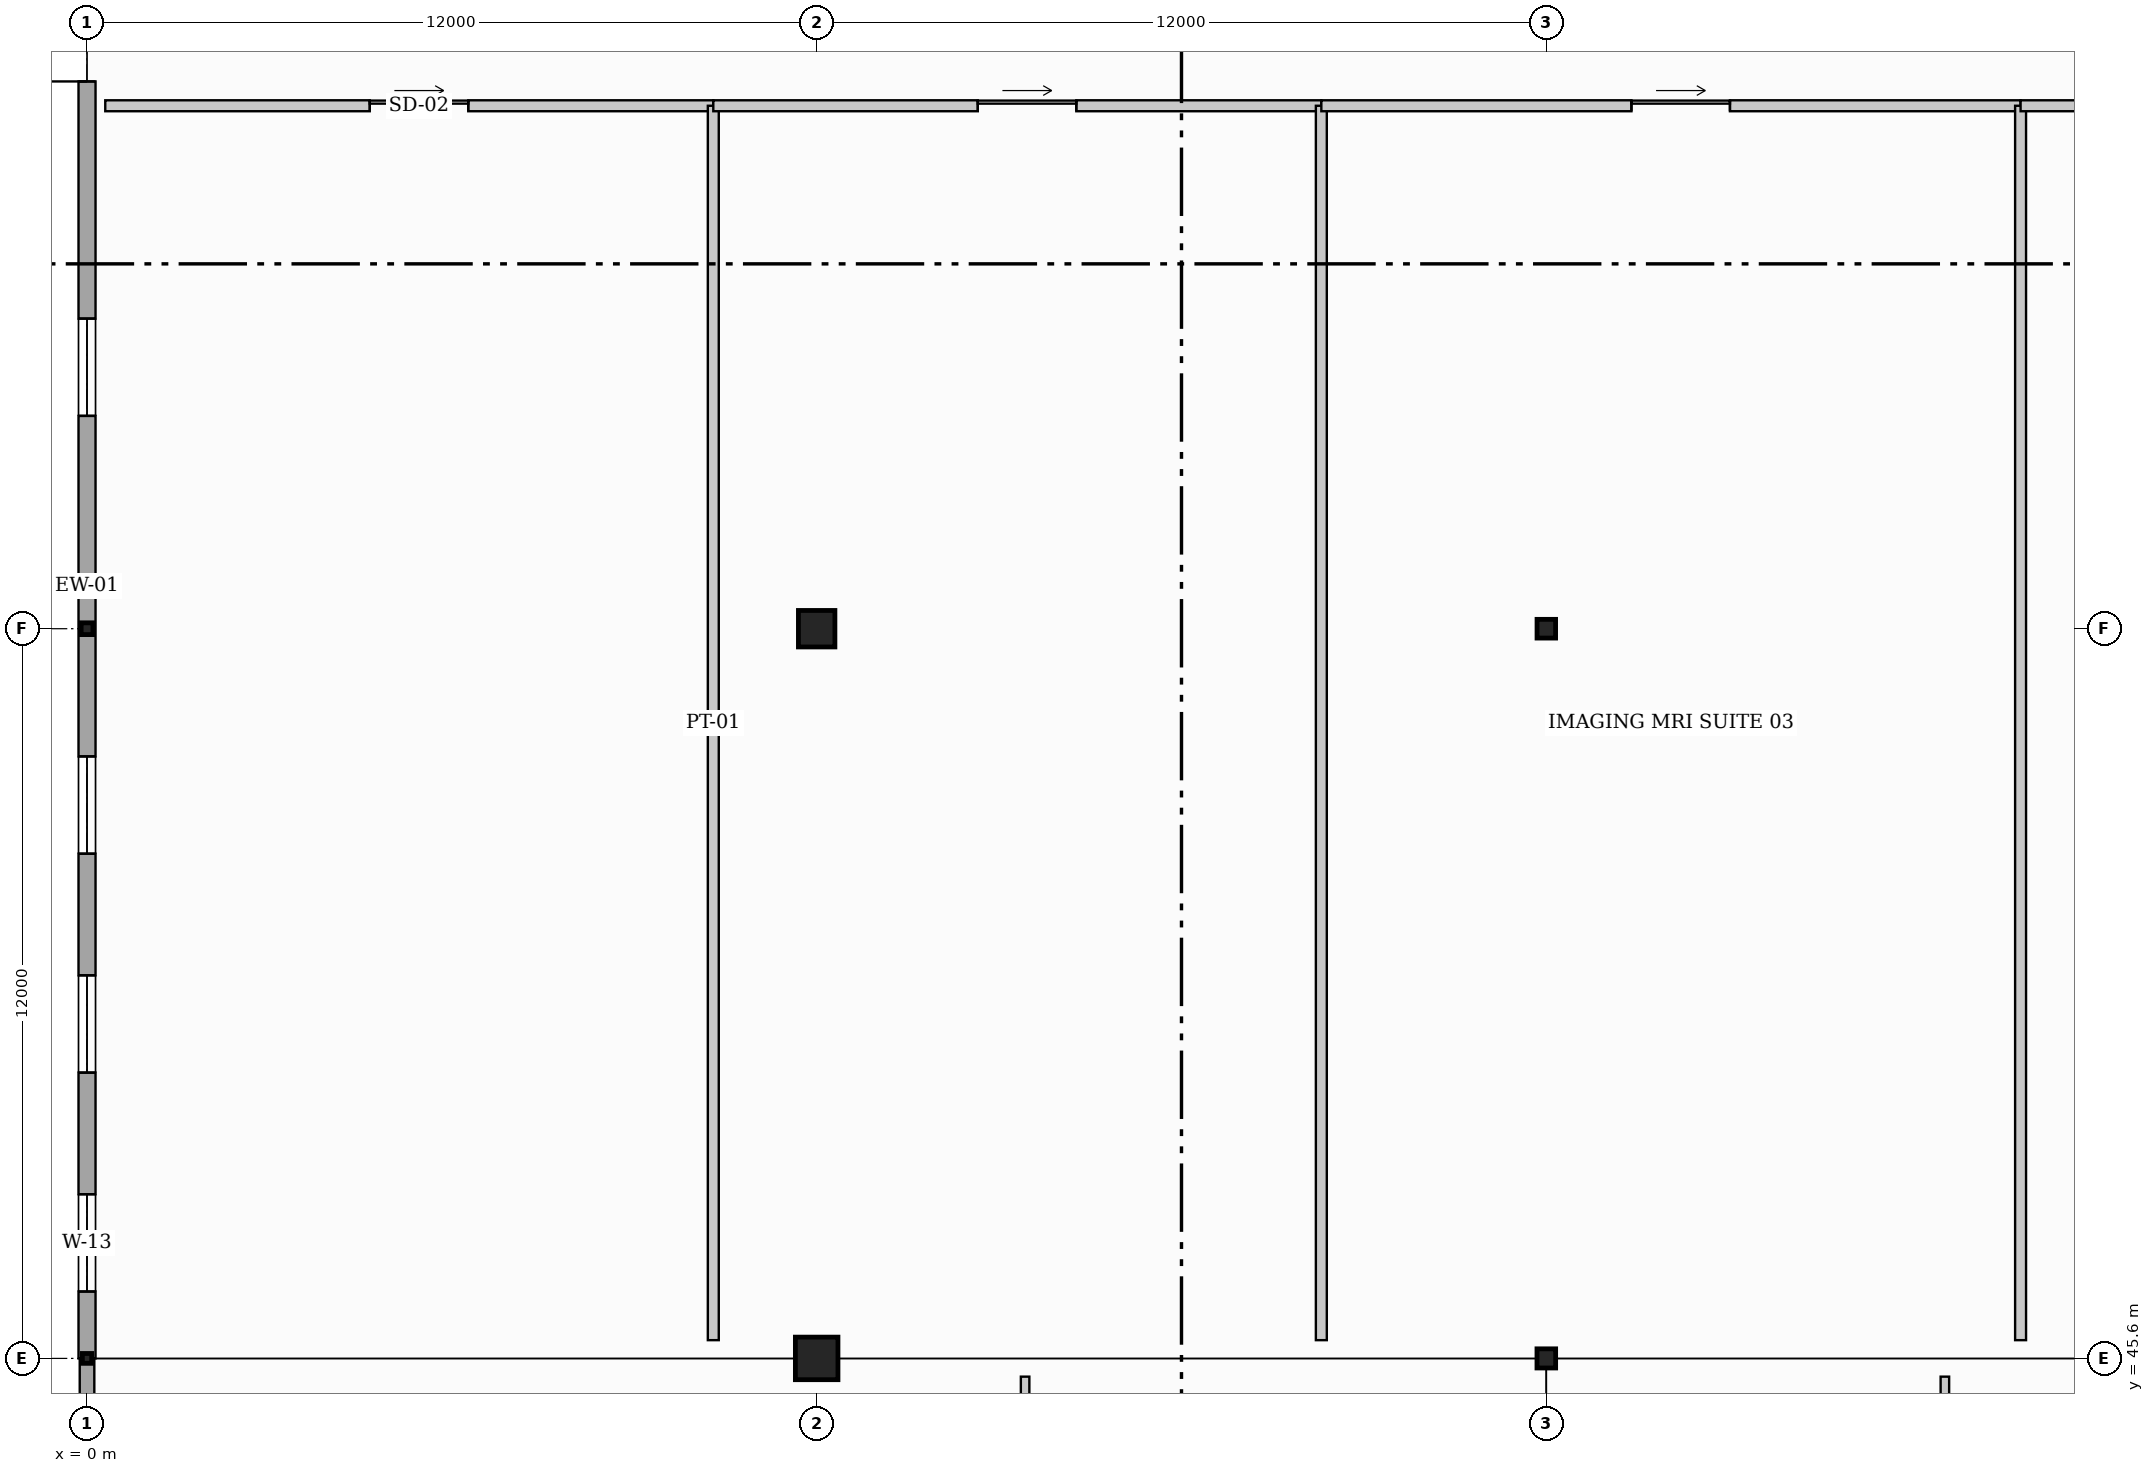
"""IFC4 building model, lengths in metres.
Left out: names, types, materials, properties, quantities, classifications, styles, units other than length and angle.
Written with IfcOpenShell. Run it as: python <this file> out.ifc"""

import sys

from ifc_helpers import new_model, si_unit, direction, frame, frame_2d, origin, origin_2d, place, context, subcontext, project, spatial, rectangle, hollow_circle, i_section, extrude, element, fill, save


model = new_model("IFC4")
c1 = context("Model", 3, precision=1e-05, world=origin(), true_north=direction((0.0, 1.0)))
c2 = subcontext(c1, "Body", "Model", "MODEL_VIEW")
j1 = project(units=[si_unit("LENGTHUNIT", "METRE"), si_unit("PLANEANGLEUNIT", "RADIAN")], contexts=[c1])
p1 = place(None, origin())
s1 = spatial("IfcSite", under=j1, at=p1, CompositionType="ELEMENT")
p2 = place(p1, origin())
s2 = spatial("IfcBuilding", under=s1, at=p2, CompositionType="ELEMENT")
p3 = place(p2, origin())
s3 = spatial("IfcBuildingStorey", under=s2, at=p3, CompositionType="ELEMENT", Elevation=0.0)
p4 = place(p3, frame((0.0, 45.6, 0.0), z_axis=(0.0, 0.0, 1.0), x_axis=(1.0, 0.0, 0.0)))
e1 = element("IfcColumn", 1, at=p4, inside=s3, PredefinedType="COLUMN", context=c2, shape_type="SweptSolid", body=[
    extrude(i_section(OverallWidth=0.154, OverallDepth=0.162, WebThickness=0.008, FlangeThickness=0.011, at=origin_2d()), origin(), (0.0, 0.0, 1.0), 4.8),
])
p5 = place(p3, frame((0.0, 57.6, 0.0), z_axis=(0.0, 0.0, 1.0), x_axis=(1.0, 0.0, 0.0)))
e2 = element("IfcColumn", 2, at=p5, inside=s3, PredefinedType="COLUMN", context=c2, shape_type="SweptSolid", body=[
    extrude(hollow_circle(Radius=0.097, WallThickness=0.008, at=origin_2d()), origin(), (0.0, 0.0, 1.0), 4.8),
])
p6 = place(p3, frame((12.0, 45.6, 0.0), z_axis=(0.0, 0.0, 1.0), x_axis=(0.0, 1.0, 0.0)))
e3 = element("IfcColumn", 3, at=p6, inside=s3, PredefinedType="COLUMN", context=c2, shape_type="SweptSolid", body=[
    extrude(rectangle(XDim=0.7, YDim=0.7, at=origin_2d()), origin(), (0.0, 0.0, 1.0), 4.8),
])
p7 = place(p3, frame((12.0, 57.6, 0.0), z_axis=(0.0, 0.0, 1.0), x_axis=(0.0, 1.0, 0.0)))
e4 = element("IfcColumn", 4, at=p7, inside=s3, PredefinedType="COLUMN", context=c2, shape_type="SweptSolid", body=[
    extrude(rectangle(XDim=0.6, YDim=0.6, at=origin_2d()), origin(), (0.0, 0.0, 1.0), 4.8),
])
p8 = place(p3, frame((24.0, 45.6, 0.0), z_axis=(0.0, 0.0, 1.0), x_axis=(1.0, 0.0, 0.0)))
e5 = element("IfcColumn", 5, at=p8, inside=s3, PredefinedType="COLUMN", context=c2, shape_type="SweptSolid", body=[
    extrude(i_section(OverallWidth=0.307, OverallDepth=0.315, WebThickness=0.012, FlangeThickness=0.019, at=origin_2d()), origin(), (0.0, 0.0, 1.0), 4.8),
])
p9 = place(p3, frame((24.0, 57.6, 0.0), z_axis=(0.0, 0.0, 1.0), x_axis=(1.0, 0.0, 0.0)))
e6 = element("IfcColumn", 6, at=p9, inside=s3, PredefinedType="COLUMN", context=c2, shape_type="SweptSolid", body=[
    extrude(i_section(OverallWidth=0.305, OverallDepth=0.308, WebThickness=0.01, FlangeThickness=0.015, at=origin_2d()), origin(), (0.0, 0.0, 1.0), 4.8),
])
p10 = place(p3, frame((0.0, 0.0, 0.0), z_axis=(0.0, 0.0, 1.0), x_axis=(0.0, 1.0, 0.0)))
e7 = element("IfcWall", 7, at=p10, inside=s3, PredefinedType="STANDARD", context=c2, shape_type="SweptSolid", body=[
    extrude(rectangle(XDim=45.6, YDim=0.24, at=frame_2d((22.8, 0.0))), origin(), (0.0, 0.0, 1.0), 3.738),
])
p11 = place(p10, frame((15.0, 0.0, 0.0)))
e8 = element("IfcOpeningElement", 8, at=p11, cuts=e7, PredefinedType="OPENING", context=c2, shape_type="SweptSolid", body=[
    extrude(rectangle(XDim=2.3, YDim=2.3, at=frame_2d((1.15, 1.15))), frame((0.0, 0.13, 0.0), z_axis=(0.0, -1.0, 0.0), x_axis=(1.0, 0.0, 0.0)), (0.0, 0.0, 1.0), 0.26),
])
p12 = place(p10, frame((1.1, 0.0, 0.95)))
e9 = element("IfcOpeningElement", 9, at=p12, cuts=e7, PredefinedType="OPENING", context=c2, shape_type="SweptSolid", body=[
    extrude(rectangle(XDim=3.0, YDim=1.8, at=frame_2d((1.5, 0.9))), frame((0.0, 0.13, 0.0), z_axis=(0.0, -1.0, 0.0), x_axis=(1.0, 0.0, 0.0)), (0.0, 0.0, 1.0), 0.26),
])
p13 = place(p10, frame((5.6, 0.0, 0.95)))
e10 = element("IfcOpeningElement", 10, at=p13, cuts=e7, PredefinedType="OPENING", context=c2, shape_type="SweptSolid", body=[
    extrude(rectangle(XDim=3.0, YDim=1.8, at=frame_2d((1.5, 0.9))), frame((0.0, 0.13, 0.0), z_axis=(0.0, -1.0, 0.0), x_axis=(1.0, 0.0, 0.0)), (0.0, 0.0, 1.0), 0.26),
])
p14 = place(p10, frame((23.6, 0.0, 0.95)))
e11 = element("IfcOpeningElement", 11, at=p14, cuts=e7, PredefinedType="OPENING", context=c2, shape_type="SweptSolid", body=[
    extrude(rectangle(XDim=3.0, YDim=1.8, at=frame_2d((1.5, 0.9))), frame((0.0, 0.13, 0.0), z_axis=(0.0, -1.0, 0.0), x_axis=(1.0, 0.0, 0.0)), (0.0, 0.0, 1.0), 0.26),
])
p15 = place(p10, frame((28.1, 0.0, 0.95)))
e12 = element("IfcOpeningElement", 12, at=p15, cuts=e7, PredefinedType="OPENING", context=c2, shape_type="SweptSolid", body=[
    extrude(rectangle(XDim=3.0, YDim=1.8, at=frame_2d((1.5, 0.9))), frame((0.0, 0.13, 0.0), z_axis=(0.0, -1.0, 0.0), x_axis=(1.0, 0.0, 0.0)), (0.0, 0.0, 1.0), 0.26),
])
p16 = place(p10, frame((37.1, 0.0, 0.95)))
e13 = element("IfcOpeningElement", 13, at=p16, cuts=e7, PredefinedType="OPENING", context=c2, shape_type="SweptSolid", body=[
    extrude(rectangle(XDim=3.0, YDim=1.8, at=frame_2d((1.5, 0.9))), frame((0.0, 0.13, 0.0), z_axis=(0.0, -1.0, 0.0), x_axis=(1.0, 0.0, 0.0)), (0.0, 0.0, 1.0), 0.26),
])
p17 = place(p10, frame((41.6, 0.0, 0.95)))
e14 = element("IfcOpeningElement", 14, at=p17, cuts=e7, PredefinedType="OPENING", context=c2, shape_type="SweptSolid", body=[
    extrude(rectangle(XDim=3.0, YDim=1.8, at=frame_2d((1.5, 0.9))), frame((0.0, 0.13, 0.0), z_axis=(0.0, -1.0, 0.0), x_axis=(1.0, 0.0, 0.0)), (0.0, 0.0, 1.0), 0.26),
])
p18 = place(p3, frame((0.0, 45.6, 0.0), z_axis=(0.0, 0.0, 1.0), x_axis=(0.0, 1.0, 0.0)))
e15 = element("IfcWall", 15, at=p18, inside=s3, PredefinedType="STANDARD", context=c2, shape_type="SweptSolid", body=[
    extrude(rectangle(XDim=36.0, YDim=0.28, at=frame_2d((18.0, 0.0))), origin(), (0.0, 0.0, 1.0), 3.828),
])
p19 = place(p18, frame((21.0, 0.0, 0.0)))
e16 = element("IfcOpeningElement", 16, at=p19, cuts=e15, PredefinedType="OPENING", context=c2, shape_type="SweptSolid", body=[
    extrude(rectangle(XDim=2.3, YDim=2.3, at=frame_2d((1.15, 1.15))), frame((0.0, 0.15, 0.0), z_axis=(0.0, -1.0, 0.0), x_axis=(1.0, 0.0, 0.0)), (0.0, 0.0, 1.0), 0.3),
])
p20 = place(p18, frame((1.1, 0.0, 0.95)))
e17 = element("IfcOpeningElement", 17, at=p20, cuts=e15, PredefinedType="OPENING", context=c2, shape_type="SweptSolid", body=[
    extrude(rectangle(XDim=1.6, YDim=2.1, at=frame_2d((0.8, 1.05))), frame((0.0, 0.15, 0.0), z_axis=(0.0, -1.0, 0.0), x_axis=(1.0, 0.0, 0.0)), (0.0, 0.0, 1.0), 0.3),
])
p21 = place(p18, frame((4.7, 0.0, 0.95)))
e18 = element("IfcOpeningElement", 18, at=p21, cuts=e15, PredefinedType="OPENING", context=c2, shape_type="SweptSolid", body=[
    extrude(rectangle(XDim=1.6, YDim=2.1, at=frame_2d((0.8, 1.05))), frame((0.0, 0.15, 0.0), z_axis=(0.0, -1.0, 0.0), x_axis=(1.0, 0.0, 0.0)), (0.0, 0.0, 1.0), 0.3),
])
p22 = place(p18, frame((8.3, 0.0, 0.95)))
e19 = element("IfcOpeningElement", 19, at=p22, cuts=e15, PredefinedType="OPENING", context=c2, shape_type="SweptSolid", body=[
    extrude(rectangle(XDim=1.6, YDim=2.1, at=frame_2d((0.8, 1.05))), frame((0.0, 0.15, 0.0), z_axis=(0.0, -1.0, 0.0), x_axis=(1.0, 0.0, 0.0)), (0.0, 0.0, 1.0), 0.3),
])
p23 = place(p18, frame((15.5, 0.0, 0.95)))
e20 = element("IfcOpeningElement", 20, at=p23, cuts=e15, PredefinedType="OPENING", context=c2, shape_type="SweptSolid", body=[
    extrude(rectangle(XDim=1.6, YDim=2.1, at=frame_2d((0.8, 1.05))), frame((0.0, 0.15, 0.0), z_axis=(0.0, -1.0, 0.0), x_axis=(1.0, 0.0, 0.0)), (0.0, 0.0, 1.0), 0.3),
])
p24 = place(p18, frame((26.3, 0.0, 0.95)))
e21 = element("IfcOpeningElement", 21, at=p24, cuts=e15, PredefinedType="OPENING", context=c2, shape_type="SweptSolid", body=[
    extrude(rectangle(XDim=1.6, YDim=2.1, at=frame_2d((0.8, 1.05))), frame((0.0, 0.15, 0.0), z_axis=(0.0, -1.0, 0.0), x_axis=(1.0, 0.0, 0.0)), (0.0, 0.0, 1.0), 0.3),
])
p25 = place(p18, frame((29.9, 0.0, 0.95)))
e22 = element("IfcOpeningElement", 22, at=p25, cuts=e15, PredefinedType="OPENING", context=c2, shape_type="SweptSolid", body=[
    extrude(rectangle(XDim=1.6, YDim=2.1, at=frame_2d((0.8, 1.05))), frame((0.0, 0.15, 0.0), z_axis=(0.0, -1.0, 0.0), x_axis=(1.0, 0.0, 0.0)), (0.0, 0.0, 1.0), 0.3),
])
p26 = place(p3, frame((15.428, 37.85, 0.0), z_axis=(0.0, 0.0, 1.0), x_axis=(0.0, 1.0, 0.0)))
e23 = element("IfcWall", 23, at=p26, inside=s3, PredefinedType="PARTITIONING", context=c2, shape_type="SweptSolid", body=[
    extrude(rectangle(XDim=7.45, YDim=0.14, at=frame_2d((3.725, 0.0))), origin(), (0.0, 0.0, 1.0), 3.897),
])
p27 = place(p3, frame((30.555, 17.8, 0.0), z_axis=(0.0, 0.0, 1.0), x_axis=(0.0, 1.0, 0.0)))
e24 = element("IfcWall", 24, at=p27, inside=s3, PredefinedType="PARTITIONING", context=c2, shape_type="SweptSolid", body=[
    extrude(rectangle(XDim=27.5, YDim=0.14, at=frame_2d((13.75, 0.0))), origin(), (0.0, 0.0, 1.0), 3.828),
])
p28 = place(p3, frame((0.3, 66.2, 0.0), z_axis=(0.0, 0.0, 1.0), x_axis=(1.0, 0.0, 0.0)))
e25 = element("IfcWall", 25, at=p28, inside=s3, PredefinedType="PARTITIONING", context=c2, shape_type="SweptSolid", body=[
    extrude(rectangle(XDim=10.0, YDim=0.18, at=frame_2d((5.0, 0.0))), origin(), (0.0, 0.0, 1.0), 4.228),
])
p29 = place(p28, frame((4.35, 0.0, 0.0)))
e26 = element("IfcOpeningElement", 26, at=p29, cuts=e25, PredefinedType="OPENING", context=c2, shape_type="SweptSolid", body=[
    extrude(rectangle(XDim=1.62, YDim=2.3, at=frame_2d((0.81, 1.15))), frame((0.0, 0.1, 0.0), z_axis=(0.0, -1.0, 0.0), x_axis=(1.0, 0.0, 0.0)), (0.0, 0.0, 1.0), 0.2),
])
p30 = place(p3, frame((10.3, 45.9, 0.0), z_axis=(0.0, 0.0, 1.0), x_axis=(0.0, 1.0, 0.0)))
e27 = element("IfcWall", 27, at=p30, inside=s3, PredefinedType="PARTITIONING", context=c2, shape_type="SweptSolid", body=[
    extrude(rectangle(XDim=20.3, YDim=0.18, at=frame_2d((10.15, 0.0))), origin(), (0.0, 0.0, 1.0), 3.828),
])
p31 = place(p3, frame((10.3, 66.2, 0.0), z_axis=(0.0, 0.0, 1.0), x_axis=(1.0, 0.0, 0.0)))
e28 = element("IfcWall", 28, at=p31, inside=s3, PredefinedType="PARTITIONING", context=c2, shape_type="SweptSolid", body=[
    extrude(rectangle(XDim=10.0, YDim=0.18, at=frame_2d((5.0, 0.0))), origin(), (0.0, 0.0, 1.0), 3.976),
])
p32 = place(p31, frame((4.35, 0.0, 0.0)))
e29 = element("IfcOpeningElement", 29, at=p32, cuts=e28, PredefinedType="OPENING", context=c2, shape_type="SweptSolid", body=[
    extrude(rectangle(XDim=1.62, YDim=2.3, at=frame_2d((0.81, 1.15))), frame((0.0, 0.1, 0.0), z_axis=(0.0, -1.0, 0.0), x_axis=(1.0, 0.0, 0.0)), (0.0, 0.0, 1.0), 0.2),
])
p33 = place(p3, frame((20.3, 45.9, 0.0), z_axis=(0.0, 0.0, 1.0), x_axis=(0.0, 1.0, 0.0)))
e30 = element("IfcWall", 30, at=p33, inside=s3, PredefinedType="PARTITIONING", context=c2, shape_type="SweptSolid", body=[
    extrude(rectangle(XDim=20.3, YDim=0.18, at=frame_2d((10.15, 0.0))), origin(), (0.0, 0.0, 1.0), 3.897),
])
p34 = place(p3, frame((20.3, 66.2, 0.0), z_axis=(0.0, 0.0, 1.0), x_axis=(1.0, 0.0, 0.0)))
e31 = element("IfcWall", 31, at=p34, inside=s3, PredefinedType="PARTITIONING", context=c2, shape_type="SweptSolid", body=[
    extrude(rectangle(XDim=11.5, YDim=0.18, at=frame_2d((5.75, 0.0))), origin(), (0.0, 0.0, 1.0), 3.48),
])
p35 = place(p34, frame((5.1, 0.0, 0.0)))
e32 = element("IfcOpeningElement", 32, at=p35, cuts=e31, PredefinedType="OPENING", context=c2, shape_type="SweptSolid", body=[
    extrude(rectangle(XDim=1.62, YDim=2.3, at=frame_2d((0.81, 1.15))), frame((0.0, 0.1, 0.0), z_axis=(0.0, -1.0, 0.0), x_axis=(1.0, 0.0, 0.0)), (0.0, 0.0, 1.0), 0.2),
])
p36 = place(p3, frame((31.8, 45.9, 0.0), z_axis=(0.0, 0.0, 1.0), x_axis=(0.0, 1.0, 0.0)))
e33 = element("IfcWall", 33, at=p36, inside=s3, PredefinedType="PARTITIONING", context=c2, shape_type="SweptSolid", body=[
    extrude(rectangle(XDim=20.3, YDim=0.18, at=frame_2d((10.15, 0.0))), origin(), (0.0, 0.0, 1.0), 3.902),
])
p37 = place(p3, frame((31.8, 66.2, 0.0), z_axis=(0.0, 0.0, 1.0), x_axis=(1.0, 0.0, 0.0)))
e34 = element("IfcWall", 34, at=p37, inside=s3, PredefinedType="PARTITIONING", context=c2, shape_type="SweptSolid", body=[
    extrude(rectangle(XDim=20.5, YDim=0.18, at=frame_2d((10.25, 0.0))), origin(), (0.0, 0.0, 1.0), 3.53),
])
p38 = place(p37, frame((9.6, 0.0, 0.0)))
e35 = element("IfcOpeningElement", 35, at=p38, cuts=e34, PredefinedType="OPENING", context=c2, shape_type="SweptSolid", body=[
    extrude(rectangle(XDim=1.62, YDim=2.3, at=frame_2d((0.81, 1.15))), frame((0.0, 0.1, 0.0), z_axis=(0.0, -1.0, 0.0), x_axis=(1.0, 0.0, 0.0)), (0.0, 0.0, 1.0), 0.2),
])
p39 = place(p19, origin())
e36 = element("IfcDoor", 36, at=p39, inside=s3, OperationType="DOUBLE_DOOR_SINGLE_SWING", PredefinedType="DOOR", context=c2, shape_type="SweptSolid", body=[
    extrude(rectangle(XDim=2.3, YDim=2.3, at=frame_2d((1.15, 1.15))), frame((0.0, 0.025, 0.0), z_axis=(0.0, -1.0, 0.0), x_axis=(1.0, 0.0, 0.0)), (0.0, 0.0, 1.0), 0.05),
])
fill(e16, e36)
p40 = place(p20, origin())
e37 = element("IfcWindow", 37, at=p40, inside=s3, PartitioningType="DOUBLE_PANEL_VERTICAL", PredefinedType="WINDOW", context=c2, shape_type="SweptSolid", body=[
    extrude(rectangle(XDim=1.6, YDim=2.1, at=frame_2d((0.8, 1.05))), frame((0.0, 0.03, 0.0), z_axis=(0.0, -1.0, 0.0), x_axis=(1.0, 0.0, 0.0)), (0.0, 0.0, 1.0), 0.06),
])
fill(e17, e37)
p41 = place(p21, origin())
e38 = element("IfcWindow", 38, at=p41, inside=s3, PartitioningType="DOUBLE_PANEL_VERTICAL", PredefinedType="WINDOW", context=c2, shape_type="SweptSolid", body=[
    extrude(rectangle(XDim=1.6, YDim=2.1, at=frame_2d((0.8, 1.05))), frame((0.0, 0.03, 0.0), z_axis=(0.0, -1.0, 0.0), x_axis=(1.0, 0.0, 0.0)), (0.0, 0.0, 1.0), 0.06),
])
fill(e18, e38)
p42 = place(p22, origin())
e39 = element("IfcWindow", 39, at=p42, inside=s3, PartitioningType="DOUBLE_PANEL_VERTICAL", PredefinedType="WINDOW", context=c2, shape_type="SweptSolid", body=[
    extrude(rectangle(XDim=1.6, YDim=2.1, at=frame_2d((0.8, 1.05))), frame((0.0, 0.03, 0.0), z_axis=(0.0, -1.0, 0.0), x_axis=(1.0, 0.0, 0.0)), (0.0, 0.0, 1.0), 0.06),
])
fill(e19, e39)
p43 = place(p23, origin())
e40 = element("IfcWindow", 40, at=p43, inside=s3, PartitioningType="DOUBLE_PANEL_VERTICAL", PredefinedType="WINDOW", context=c2, shape_type="SweptSolid", body=[
    extrude(rectangle(XDim=1.6, YDim=2.1, at=frame_2d((0.8, 1.05))), frame((0.0, 0.03, 0.0), z_axis=(0.0, -1.0, 0.0), x_axis=(1.0, 0.0, 0.0)), (0.0, 0.0, 1.0), 0.06),
])
fill(e20, e40)
p44 = place(p29, origin())
e41 = element("IfcDoor", 41, at=p44, inside=s3, OperationType="SLIDING_TO_RIGHT", PredefinedType="DOOR", context=c2, shape_type="SweptSolid", body=[
    extrude(rectangle(XDim=1.62, YDim=2.3, at=frame_2d((0.81, 1.15))), frame((0.0, 0.025, 0.0), z_axis=(0.0, -1.0, 0.0), x_axis=(1.0, 0.0, 0.0)), (0.0, 0.0, 1.0), 0.05),
])
fill(e26, e41)
p45 = place(p32, origin())
e42 = element("IfcDoor", 42, at=p45, inside=s3, OperationType="SLIDING_TO_RIGHT", PredefinedType="DOOR", context=c2, shape_type="SweptSolid", body=[
    extrude(rectangle(XDim=1.62, YDim=2.3, at=frame_2d((0.81, 1.15))), frame((0.0, 0.025, 0.0), z_axis=(0.0, -1.0, 0.0), x_axis=(1.0, 0.0, 0.0)), (0.0, 0.0, 1.0), 0.05),
])
fill(e29, e42)
p46 = place(p35, origin())
e43 = element("IfcDoor", 43, at=p46, inside=s3, OperationType="SLIDING_TO_RIGHT", PredefinedType="DOOR", context=c2, shape_type="SweptSolid", body=[
    extrude(rectangle(XDim=1.62, YDim=2.3, at=frame_2d((0.81, 1.15))), frame((0.0, 0.025, 0.0), z_axis=(0.0, -1.0, 0.0), x_axis=(1.0, 0.0, 0.0)), (0.0, 0.0, 1.0), 0.05),
])
fill(e32, e43)
save(model, sys.argv[1])
